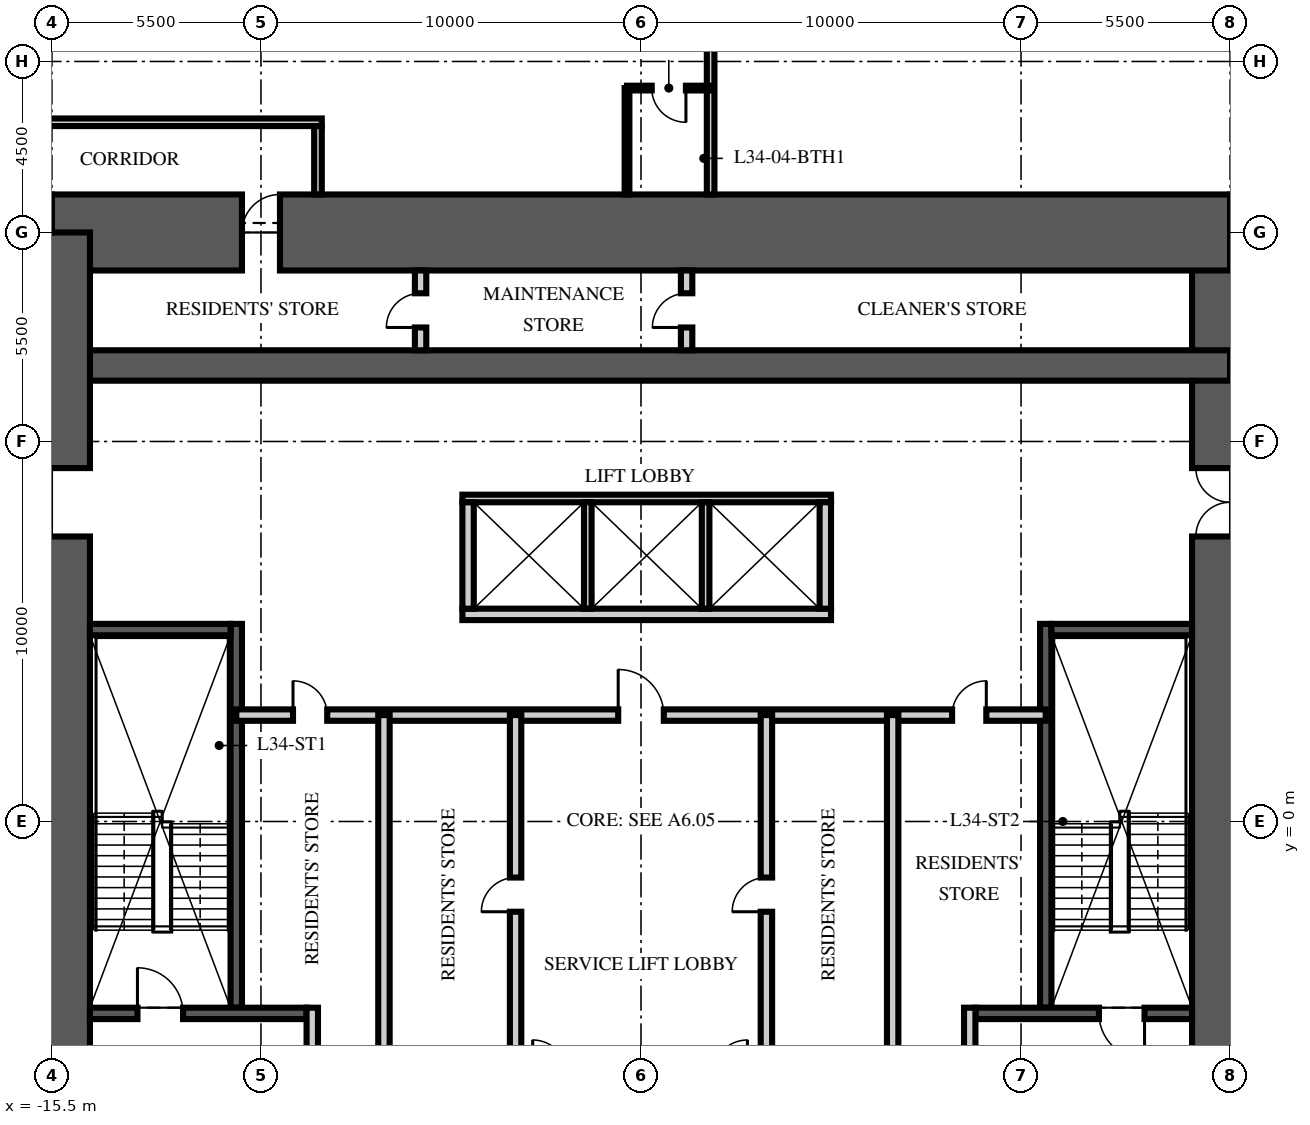
"""IFC4 building model, lengths in metres.
Left out: names, types, materials, properties, quantities, classifications, styles, units other than length and angle.
Written with IfcOpenShell. Run it as: python <this file> out.ifc"""

import sys

from ifc_helpers import new_model, si_unit, direction, frame, frame_2d, origin, place, context, subcontext, project, spatial, rectangle, extrude, element, fill, save


model = new_model("IFC4")
c1 = context("Model", 3, precision=1e-05, world=origin(), true_north=direction((0.0, 1.0)))
c2 = subcontext(c1, "Body", "Model", "MODEL_VIEW")
j1 = project(units=[si_unit("LENGTHUNIT", "METRE"), si_unit("PLANEANGLEUNIT", "RADIAN")], contexts=[c1])
p1 = place(None, origin())
s1 = spatial("IfcSite", under=j1, at=p1, CompositionType="ELEMENT")
p2 = place(p1, origin())
s2 = spatial("IfcBuilding", under=s1, at=p2, CompositionType="ELEMENT")
p3 = place(p2, frame((0.0, 0.0, 137.25)))
s3 = spatial("IfcBuildingStorey", under=s2, at=p3, CompositionType="ELEMENT", Elevation=137.25)
p4 = place(p3, frame((15.5, -15.5, -0.25), z_axis=(0.0, 0.0, 1.0), x_axis=(0.0, 1.0, 0.0)))
e1 = element("IfcWall", 1, at=p4, inside=s3, PredefinedType="SHEAR", context=c2, shape_type="SweptSolid", body=[
    extrude(rectangle(XDim=31.0, YDim=2.0, at=frame_2d((15.5, 0.0))), origin(), (0.0, 0.0, 1.0), 3.75),
])
p5 = place(p4, frame((6.5, 0.0, 0.25)))
e2 = element("IfcOpeningElement", 2, at=p5, cuts=e1, PredefinedType="OPENING", context=c2, shape_type="SweptSolid", body=[
    extrude(rectangle(XDim=1.2, YDim=2.1, at=frame_2d((0.6, 1.05))), frame((0.0, 1.01, 0.0), z_axis=(0.0, -1.0, 0.0), x_axis=(1.0, 0.0, 0.0)), (0.0, 0.0, 1.0), 2.02),
])
p6 = place(p4, frame((23.0, 0.0, 0.25)))
e3 = element("IfcOpeningElement", 3, at=p6, cuts=e1, PredefinedType="OPENING", context=c2, shape_type="SweptSolid", body=[
    extrude(rectangle(XDim=1.8, YDim=2.1, at=frame_2d((0.9, 1.05))), frame((0.0, 1.01, 0.0), z_axis=(0.0, -1.0, 0.0), x_axis=(1.0, 0.0, 0.0)), (0.0, 0.0, 1.0), 2.02),
])
p7 = place(p3, frame((-15.5, 15.5, -0.25), z_axis=(0.0, 0.0, 1.0), x_axis=(1.0, 0.0, 0.0)))
e4 = element("IfcWall", 4, at=p7, inside=s3, PredefinedType="SHEAR", context=c2, shape_type="SweptSolid", body=[
    extrude(rectangle(XDim=31.0, YDim=2.0, at=frame_2d((15.5, 0.0))), origin(), (0.0, 0.0, 1.0), 3.75),
])
p8 = place(p7, frame((5.0, 0.0, 0.25)))
e5 = element("IfcOpeningElement", 5, at=p8, cuts=e4, PredefinedType="OPENING", context=c2, shape_type="SweptSolid", body=[
    extrude(rectangle(XDim=1.0, YDim=2.1, at=frame_2d((0.5, 1.05))), frame((0.0, 1.01, 0.0), z_axis=(0.0, -1.0, 0.0), x_axis=(1.0, 0.0, 0.0)), (0.0, 0.0, 1.0), 2.02),
])
p9 = place(p3, frame((-15.5, 12.0, -0.25), z_axis=(0.0, 0.0, 1.0), x_axis=(1.0, 0.0, 0.0)))
e6 = element("IfcWall", 6, at=p9, inside=s3, PredefinedType="SHEAR", context=c2, shape_type="SweptSolid", body=[
    extrude(rectangle(XDim=31.0, YDim=0.8, at=frame_2d((15.5, 0.0))), origin(), (0.0, 0.0, 1.0), 3.75),
])
p10 = place(p3, frame((-15.5, -15.5, -0.25), z_axis=(0.0, 0.0, 1.0), x_axis=(0.0, 1.0, 0.0)))
e7 = element("IfcWall", 7, at=p10, inside=s3, PredefinedType="SHEAR", context=c2, shape_type="SweptSolid", body=[
    extrude(rectangle(XDim=31.0, YDim=2.0, at=frame_2d((15.5, 0.0))), origin(), (0.0, 0.0, 1.0), 3.75),
])
p11 = place(p10, frame((6.5, 0.0, 0.25)))
e8 = element("IfcOpeningElement", 8, at=p11, cuts=e7, PredefinedType="OPENING", context=c2, shape_type="SweptSolid", body=[
    extrude(rectangle(XDim=1.2, YDim=2.1, at=frame_2d((0.6, 1.05))), frame((0.0, 1.01, 0.0), z_axis=(0.0, -1.0, 0.0), x_axis=(1.0, 0.0, 0.0)), (0.0, 0.0, 1.0), 2.02),
])
p12 = place(p10, frame((23.0, 0.0, 0.25)))
e9 = element("IfcOpeningElement", 9, at=p12, cuts=e7, PredefinedType="OPENING", context=c2, shape_type="SweptSolid", body=[
    extrude(rectangle(XDim=1.8, YDim=2.1, at=frame_2d((0.9, 1.05))), frame((0.0, 1.01, 0.0), z_axis=(0.0, -1.0, 0.0), x_axis=(1.0, 0.0, 0.0)), (0.0, 0.0, 1.0), 2.02),
])
p13 = place(p3, frame((-10.65, -4.9, 0.0), z_axis=(0.0, 0.0, 1.0), x_axis=(0.0, 1.0, 0.0)))
e10 = element("IfcWall", 10, at=p13, inside=s3, PredefinedType="SOLIDWALL", context=c2, shape_type="SweptSolid", body=[
    extrude(rectangle(XDim=10.1, YDim=0.3, at=frame_2d((5.05, 0.0))), origin(), (0.0, 0.0, 1.0), 3.5),
])
p14 = place(p3, frame((-14.5, -5.05, 0.0), z_axis=(0.0, 0.0, 1.0), x_axis=(1.0, 0.0, 0.0)))
e11 = element("IfcWall", 11, at=p14, inside=s3, PredefinedType="SOLIDWALL", context=c2, shape_type="SweptSolid", body=[
    extrude(rectangle(XDim=5.7, YDim=0.3, at=frame_2d((2.85, 0.0))), origin(), (0.0, 0.0, 1.0), 3.5),
])
p15 = place(p14, frame((1.25, 0.0, 0.0)))
e12 = element("IfcOpeningElement", 12, at=p15, cuts=e11, PredefinedType="OPENING", context=c2, shape_type="SweptSolid", body=[
    extrude(rectangle(XDim=1.2, YDim=2.1, at=frame_2d((0.6, 1.05))), frame((0.0, 0.16, 0.0), z_axis=(0.0, -1.0, 0.0), x_axis=(1.0, 0.0, 0.0)), (0.0, 0.0, 1.0), 0.32),
])
p16 = place(p3, frame((-14.5, 5.05, 0.0), z_axis=(0.0, 0.0, 1.0), x_axis=(1.0, 0.0, 0.0)))
e13 = element("IfcWall", 13, at=p16, inside=s3, PredefinedType="SOLIDWALL", context=c2, shape_type="SweptSolid", body=[
    extrude(rectangle(XDim=3.7, YDim=0.3, at=frame_2d((1.85, 0.0))), origin(), (0.0, 0.0, 1.0), 3.5),
])
p17 = place(p3, frame((-8.65, -11.6, 0.0), z_axis=(0.0, 0.0, 1.0), x_axis=(0.0, 1.0, 0.0)))
e14 = element("IfcWall", 14, at=p17, inside=s3, PredefinedType="PARTITIONING", context=c2, shape_type="SweptSolid", body=[
    extrude(rectangle(XDim=6.7, YDim=0.3, at=frame_2d((3.35, 0.0))), origin(), (0.0, 0.0, 1.0), 3.5),
])
p18 = place(p17, frame((2.85, 0.0, 0.0)))
e15 = element("IfcOpeningElement", 15, at=p18, cuts=e14, PredefinedType="OPENING", context=c2, shape_type="SweptSolid", body=[
    extrude(rectangle(XDim=1.1, YDim=2.1, at=frame_2d((0.55, 1.05))), frame((0.0, 0.16, 0.0), z_axis=(0.0, -1.0, 0.0), x_axis=(1.0, 0.0, 0.0)), (0.0, 0.0, 1.0), 0.32),
])
p19 = place(p3, frame((10.65, -4.9, 0.0), z_axis=(0.0, 0.0, 1.0), x_axis=(0.0, 1.0, 0.0)))
e16 = element("IfcWall", 16, at=p19, inside=s3, PredefinedType="SOLIDWALL", context=c2, shape_type="SweptSolid", body=[
    extrude(rectangle(XDim=10.1, YDim=0.3, at=frame_2d((5.05, 0.0))), origin(), (0.0, 0.0, 1.0), 3.5),
])
p20 = place(p3, frame((14.5, -5.05, 0.0), z_axis=(0.0, 0.0, 1.0), x_axis=(-1.0, 0.0, 0.0)))
e17 = element("IfcWall", 17, at=p20, inside=s3, PredefinedType="SOLIDWALL", context=c2, shape_type="SweptSolid", body=[
    extrude(rectangle(XDim=5.7, YDim=0.3, at=frame_2d((2.85, 0.0))), origin(), (0.0, 0.0, 1.0), 3.5),
])
p21 = place(p20, frame((1.25, 0.0, 0.0)))
e18 = element("IfcOpeningElement", 18, at=p21, cuts=e17, PredefinedType="OPENING", context=c2, shape_type="SweptSolid", body=[
    extrude(rectangle(XDim=1.2, YDim=2.1, at=frame_2d((0.6, 1.05))), frame((0.0, 0.16, 0.0), z_axis=(0.0, -1.0, 0.0), x_axis=(1.0, 0.0, 0.0)), (0.0, 0.0, 1.0), 0.32),
])
p22 = place(p3, frame((14.5, 5.05, 0.0), z_axis=(0.0, 0.0, 1.0), x_axis=(-1.0, 0.0, 0.0)))
e19 = element("IfcWall", 19, at=p22, inside=s3, PredefinedType="SOLIDWALL", context=c2, shape_type="SweptSolid", body=[
    extrude(rectangle(XDim=3.7, YDim=0.3, at=frame_2d((1.85, 0.0))), origin(), (0.0, 0.0, 1.0), 3.5),
])
p23 = place(p3, frame((8.65, -11.6, 0.0), z_axis=(0.0, 0.0, 1.0), x_axis=(0.0, 1.0, 0.0)))
e20 = element("IfcWall", 20, at=p23, inside=s3, PredefinedType="PARTITIONING", context=c2, shape_type="SweptSolid", body=[
    extrude(rectangle(XDim=6.7, YDim=0.3, at=frame_2d((3.35, 0.0))), origin(), (0.0, 0.0, 1.0), 3.5),
])
p24 = place(p23, frame((2.85, 0.0, 0.0)))
e21 = element("IfcOpeningElement", 21, at=p24, cuts=e20, PredefinedType="OPENING", context=c2, shape_type="SweptSolid", body=[
    extrude(rectangle(XDim=1.1, YDim=2.1, at=frame_2d((0.55, 1.05))), frame((0.0, 0.16, 0.0), z_axis=(0.0, -1.0, 0.0), x_axis=(1.0, 0.0, 0.0)), (0.0, 0.0, 1.0), 0.32),
])
p25 = place(p3, frame((-4.7, 5.45, 0.0), z_axis=(0.0, 0.0, 1.0), x_axis=(1.0, 0.0, 0.0)))
e22 = element("IfcWall", 22, at=p25, inside=s3, PredefinedType="PARTITIONING", context=c2, shape_type="SweptSolid", body=[
    extrude(rectangle(XDim=9.7, YDim=0.3, at=frame_2d((4.85, 0.0))), origin(), (0.0, 0.0, 1.0), 3.5),
])
p26 = place(p3, frame((-4.7, 8.5, 0.0), z_axis=(0.0, 0.0, 1.0), x_axis=(1.0, 0.0, 0.0)))
e23 = element("IfcWall", 23, at=p26, inside=s3, PredefinedType="PARTITIONING", context=c2, shape_type="SweptSolid", body=[
    extrude(rectangle(XDim=9.7, YDim=0.2, at=frame_2d((4.85, 0.0))), origin(), (0.0, 0.0, 1.0), 3.5),
])
for number, where, z_axis, x_axis in (
    (24, (-4.55, 5.6, 0.0), (0.0, 0.0, 1.0), (0.0, 1.0, 0.0)),
    (25, (4.85, 5.6, 0.0), (0.0, 0.0, 1.0), (0.0, 1.0, 0.0)),
):
    element("IfcWall", number, at=place(p3, frame(where, z_axis=z_axis, x_axis=x_axis)), inside=s3, PredefinedType="PARTITIONING", context=c2, shape_type="SweptSolid", body=[
        extrude(rectangle(XDim=2.8, YDim=0.3, at=frame_2d((1.4, 0.0))), origin(), (0.0, 0.0, 1.0), 3.5),
    ])
for number, where, z_axis, x_axis in (
    (26, (-1.4, 5.6, 0.0), (0.0, 0.0, 1.0), (0.0, 1.0, 0.0)),
    (27, (1.7, 5.6, 0.0), (0.0, 0.0, 1.0), (0.0, 1.0, 0.0)),
):
    element("IfcWall", number, at=place(p3, frame(where, z_axis=z_axis, x_axis=x_axis)), inside=s3, PredefinedType="PARTITIONING", context=c2, shape_type="SweptSolid", body=[
        extrude(rectangle(XDim=2.8, YDim=0.2, at=frame_2d((1.4, 0.0))), origin(), (0.0, 0.0, 1.0), 3.5),
    ])
p27 = place(p3, frame((-10.65, 2.8, 0.0), z_axis=(0.0, 0.0, 1.0), x_axis=(1.0, 0.0, 0.0)))
e28 = element("IfcWall", 28, at=p27, inside=s3, PredefinedType="PARTITIONING", context=c2, shape_type="SweptSolid", body=[
    extrude(rectangle(XDim=21.3, YDim=0.3, at=frame_2d((10.65, 0.0))), origin(), (0.0, 0.0, 1.0), 3.5),
])
p28 = place(p27, frame((10.05, 0.0, 0.0)))
e29 = element("IfcOpeningElement", 29, at=p28, cuts=e28, PredefinedType="OPENING", context=c2, shape_type="SweptSolid", body=[
    extrude(rectangle(XDim=1.2, YDim=2.1, at=frame_2d((0.6, 1.05))), frame((0.0, 0.16, 0.0), z_axis=(0.0, -1.0, 0.0), x_axis=(1.0, 0.0, 0.0)), (0.0, 0.0, 1.0), 0.32),
])
p29 = place(p27, frame((1.493, 0.0, 0.0)))
e30 = element("IfcOpeningElement", 30, at=p29, cuts=e28, PredefinedType="OPENING", context=c2, shape_type="SweptSolid", body=[
    extrude(rectangle(XDim=0.9, YDim=2.1, at=frame_2d((0.45, 1.05))), frame((0.0, 0.16, 0.0), z_axis=(0.0, -1.0, 0.0), x_axis=(1.0, 0.0, 0.0)), (0.0, 0.0, 1.0), 0.32),
])
p30 = place(p27, frame((18.836, 0.0, 0.0)))
e31 = element("IfcOpeningElement", 31, at=p30, cuts=e28, PredefinedType="OPENING", context=c2, shape_type="SweptSolid", body=[
    extrude(rectangle(XDim=0.9, YDim=2.1, at=frame_2d((0.45, 1.05))), frame((0.0, 0.16, 0.0), z_axis=(0.0, -1.0, 0.0), x_axis=(1.0, 0.0, 0.0)), (0.0, 0.0, 1.0), 0.32),
])
p31 = place(p3, frame((-3.3, -6.65, 0.0), z_axis=(0.0, 0.0, 1.0), x_axis=(0.0, 1.0, 0.0)))
e32 = element("IfcWall", 32, at=p31, inside=s3, PredefinedType="PARTITIONING", context=c2, shape_type="SweptSolid", body=[
    extrude(rectangle(XDim=9.45, YDim=0.3, at=frame_2d((4.725, 0.0))), origin(), (0.0, 0.0, 1.0), 3.5),
])
p32 = place(p31, frame((4.275, 0.0, 0.0)))
e33 = element("IfcOpeningElement", 33, at=p32, cuts=e32, PredefinedType="OPENING", context=c2, shape_type="SweptSolid", body=[
    extrude(rectangle(XDim=0.9, YDim=2.1, at=frame_2d((0.45, 1.05))), frame((0.0, 0.16, 0.0), z_axis=(0.0, -1.0, 0.0), x_axis=(1.0, 0.0, 0.0)), (0.0, 0.0, 1.0), 0.32),
])
p33 = place(p3, frame((3.3, -6.65, 0.0), z_axis=(0.0, 0.0, 1.0), x_axis=(0.0, 1.0, 0.0)))
e34 = element("IfcWall", 34, at=p33, inside=s3, PredefinedType="PARTITIONING", context=c2, shape_type="SweptSolid", body=[
    extrude(rectangle(XDim=9.45, YDim=0.3, at=frame_2d((4.725, 0.0))), origin(), (0.0, 0.0, 1.0), 3.5),
])
p34 = place(p33, frame((4.275, 0.0, 0.0)))
e35 = element("IfcOpeningElement", 35, at=p34, cuts=e34, PredefinedType="OPENING", context=c2, shape_type="SweptSolid", body=[
    extrude(rectangle(XDim=0.9, YDim=2.1, at=frame_2d((0.45, 1.05))), frame((0.0, 0.16, 0.0), z_axis=(0.0, -1.0, 0.0), x_axis=(1.0, 0.0, 0.0)), (0.0, 0.0, 1.0), 0.32),
])
for number, where, z_axis, x_axis in (
    (36, (-6.764, -6.65, 0.0), (0.0, 0.0, 1.0), (0.0, 1.0, 0.0)),
    (37, (6.622, -6.65, 0.0), (0.0, 0.0, 1.0), (0.0, 1.0, 0.0)),
):
    element("IfcWall", number, at=place(p3, frame(where, z_axis=z_axis, x_axis=x_axis)), inside=s3, PredefinedType="PARTITIONING", context=c2, shape_type="SweptSolid", body=[
        extrude(rectangle(XDim=9.45, YDim=0.3, at=frame_2d((4.725, 0.0))), origin(), (0.0, 0.0, 1.0), 3.5),
    ])
p35 = place(p3, frame((-5.8, 12.4, 0.0), z_axis=(0.0, 0.0, 1.0), x_axis=(0.0, 1.0, 0.0)))
e38 = element("IfcWall", 38, at=p35, inside=s3, PredefinedType="PARTITIONING", context=c2, shape_type="SweptSolid", body=[
    extrude(rectangle(XDim=2.1, YDim=0.3, at=frame_2d((1.05, 0.0))), origin(), (0.0, 0.0, 1.0), 3.5),
])
p36 = place(p35, frame((0.6, 0.0, 0.0)))
e39 = element("IfcOpeningElement", 39, at=p36, cuts=e38, PredefinedType="OPENING", context=c2, shape_type="SweptSolid", body=[
    extrude(rectangle(XDim=0.9, YDim=2.1, at=frame_2d((0.45, 1.05))), frame((0.0, 0.16, 0.0), z_axis=(0.0, -1.0, 0.0), x_axis=(1.0, 0.0, 0.0)), (0.0, 0.0, 1.0), 0.32),
])
p37 = place(p3, frame((1.2, 12.4, 0.0), z_axis=(0.0, 0.0, 1.0), x_axis=(0.0, 1.0, 0.0)))
e40 = element("IfcWall", 40, at=p37, inside=s3, PredefinedType="PARTITIONING", context=c2, shape_type="SweptSolid", body=[
    extrude(rectangle(XDim=2.1, YDim=0.3, at=frame_2d((1.05, 0.0))), origin(), (0.0, 0.0, 1.0), 3.5),
])
p38 = place(p37, frame((0.6, 0.0, 0.0)))
e41 = element("IfcOpeningElement", 41, at=p38, cuts=e40, PredefinedType="OPENING", context=c2, shape_type="SweptSolid", body=[
    extrude(rectangle(XDim=0.9, YDim=2.1, at=frame_2d((0.45, 1.05))), frame((0.0, 0.16, 0.0), z_axis=(0.0, -1.0, 0.0), x_axis=(1.0, 0.0, 0.0)), (0.0, 0.0, 1.0), 0.32),
])
p39 = place(p3, frame((-18.5, 18.4, 0.0), z_axis=(0.0, 0.0, 1.0), x_axis=(1.0, 0.0, 0.0)))
e42 = element("IfcWall", 42, at=p39, inside=s3, PredefinedType="PARTITIONING", context=c2, shape_type="SweptSolid", body=[
    extrude(rectangle(XDim=10.1, YDim=0.2, at=frame_2d((5.05, 0.0))), origin(), (0.0, 0.0, 1.0), 2.3),
])
p40 = place(p3, frame((-8.5, 18.3, 0.0), z_axis=(0.0, 0.0, 1.0), x_axis=(0.0, -1.0, 0.0)))
e43 = element("IfcWall", 43, at=p40, inside=s3, PredefinedType="PARTITIONING", context=c2, shape_type="SweptSolid", body=[
    extrude(rectangle(XDim=1.8, YDim=0.2, at=frame_2d((0.9, 0.0))), origin(), (0.0, 0.0, 1.0), 3.5),
])
p41 = place(p3, frame((1.832, 16.5, 0.0), z_axis=(0.0, 0.0, 1.0), x_axis=(0.0, 1.0, 0.0)))
e44 = element("IfcWall", 44, at=p41, inside=s3, PredefinedType="PARTITIONING", context=c2, shape_type="SweptSolid", body=[
    extrude(rectangle(XDim=12.15, YDim=0.2, at=frame_2d((6.075, 0.0))), origin(), (0.0, 0.0, 1.0), 2.81),
])
p42 = place(p3, frame((1.832, 19.3, 0.0), z_axis=(0.0, 0.0, 1.0), x_axis=(-1.0, 0.0, 0.0)))
e45 = element("IfcWall", 45, at=p42, inside=s3, PredefinedType="PARTITIONING", context=c2, shape_type="SweptSolid", body=[
    extrude(rectangle(XDim=2.2, YDim=0.125, at=frame_2d((1.1, 0.0))), origin(), (0.0, 0.0, 1.0), 2.7),
])
p43 = place(p42, frame((0.65, 0.0, 0.0)))
e46 = element("IfcOpeningElement", 46, at=p43, cuts=e45, PredefinedType="OPENING", context=c2, shape_type="SweptSolid", body=[
    extrude(rectangle(XDim=0.9, YDim=2.1, at=frame_2d((0.45, 1.05))), frame((0.0, 0.073, 0.0), z_axis=(0.0, -1.0, 0.0), x_axis=(1.0, 0.0, 0.0)), (0.0, 0.0, 1.0), 0.145),
])
p44 = place(p3, frame((-0.368, 16.5, 0.0), z_axis=(0.0, 0.0, 1.0), x_axis=(0.0, 1.0, 0.0)))
e47 = element("IfcWall", 47, at=p44, inside=s3, PredefinedType="PARTITIONING", context=c2, shape_type="SweptSolid", body=[
    extrude(rectangle(XDim=2.8, YDim=0.125, at=frame_2d((1.4, 0.0))), origin(), (0.0, 0.0, 1.0), 3.5),
])
p45 = place(p15, origin())
e48 = element("IfcDoor", 48, at=p45, inside=s3, OperationType="SINGLE_SWING_LEFT", PredefinedType="DOOR", context=c2, shape_type="SweptSolid", body=[
    extrude(rectangle(XDim=1.2, YDim=2.1, at=frame_2d((0.6, 1.05))), frame((0.0, 0.025, 0.0), z_axis=(0.0, -1.0, 0.0), x_axis=(1.0, 0.0, 0.0)), (0.0, 0.0, 1.0), 0.05),
])
fill(e12, e48)
p46 = place(p12, origin())
e49 = element("IfcDoor", 49, at=p46, inside=s3, OperationType="DOUBLE_DOOR_SINGLE_SWING", PredefinedType="DOOR", context=c2, shape_type="SweptSolid", body=[
    extrude(rectangle(XDim=1.8, YDim=2.1, at=frame_2d((0.9, 1.05))), frame((0.0, 0.025, 0.0), z_axis=(0.0, -1.0, 0.0), x_axis=(1.0, 0.0, 0.0)), (0.0, 0.0, 1.0), 0.05),
])
fill(e9, e49)
p47 = place(p21, origin())
e50 = element("IfcDoor", 50, at=p47, inside=s3, OperationType="SINGLE_SWING_LEFT", PredefinedType="DOOR", context=c2, shape_type="SweptSolid", body=[
    extrude(rectangle(XDim=1.2, YDim=2.1, at=frame_2d((0.6, 1.05))), frame((0.0, 0.025, 0.0), z_axis=(0.0, -1.0, 0.0), x_axis=(1.0, 0.0, 0.0)), (0.0, 0.0, 1.0), 0.05),
])
fill(e18, e50)
p48 = place(p6, origin())
e51 = element("IfcDoor", 51, at=p48, inside=s3, OperationType="DOUBLE_DOOR_SINGLE_SWING", PredefinedType="DOOR", context=c2, shape_type="SweptSolid", body=[
    extrude(rectangle(XDim=1.8, YDim=2.1, at=frame_2d((0.9, 1.05))), frame((0.0, 0.025, 0.0), z_axis=(0.0, -1.0, 0.0), x_axis=(1.0, 0.0, 0.0)), (0.0, 0.0, 1.0), 0.05),
])
fill(e3, e51)
p49 = place(p28, origin())
e52 = element("IfcDoor", 52, at=p49, inside=s3, OperationType="SINGLE_SWING_LEFT", PredefinedType="DOOR", context=c2, shape_type="SweptSolid", body=[
    extrude(rectangle(XDim=1.2, YDim=2.1, at=frame_2d((0.6, 1.05))), frame((0.0, 0.025, 0.0), z_axis=(0.0, -1.0, 0.0), x_axis=(1.0, 0.0, 0.0)), (0.0, 0.0, 1.0), 0.05),
])
fill(e29, e52)
p50 = place(p32, origin())
e53 = element("IfcDoor", 53, at=p50, inside=s3, OperationType="SINGLE_SWING_LEFT", PredefinedType="DOOR", context=c2, shape_type="SweptSolid", body=[
    extrude(rectangle(XDim=0.9, YDim=2.1, at=frame_2d((0.45, 1.05))), frame((0.0, 0.025, 0.0), z_axis=(0.0, -1.0, 0.0), x_axis=(1.0, 0.0, 0.0)), (0.0, 0.0, 1.0), 0.05),
])
fill(e33, e53)
p51 = place(p29, origin())
e54 = element("IfcDoor", 54, at=p51, inside=s3, OperationType="SINGLE_SWING_LEFT", PredefinedType="DOOR", context=c2, shape_type="SweptSolid", body=[
    extrude(rectangle(XDim=0.9, YDim=2.1, at=frame_2d((0.45, 1.05))), frame((0.0, 0.025, 0.0), z_axis=(0.0, -1.0, 0.0), x_axis=(1.0, 0.0, 0.0)), (0.0, 0.0, 1.0), 0.05),
])
fill(e30, e54)
p52 = place(p34, origin())
e55 = element("IfcDoor", 55, at=p52, inside=s3, OperationType="SINGLE_SWING_LEFT", PredefinedType="DOOR", context=c2, shape_type="SweptSolid", body=[
    extrude(rectangle(XDim=0.9, YDim=2.1, at=frame_2d((0.45, 1.05))), frame((0.0, 0.025, 0.0), z_axis=(0.0, -1.0, 0.0), x_axis=(1.0, 0.0, 0.0)), (0.0, 0.0, 1.0), 0.05),
])
fill(e35, e55)
p53 = place(p30, origin())
e56 = element("IfcDoor", 56, at=p53, inside=s3, OperationType="SINGLE_SWING_RIGHT", PredefinedType="DOOR", context=c2, shape_type="SweptSolid", body=[
    extrude(rectangle(XDim=0.9, YDim=2.1, at=frame_2d((0.45, 1.05))), frame((0.0, 0.025, 0.0), z_axis=(0.0, -1.0, 0.0), x_axis=(1.0, 0.0, 0.0)), (0.0, 0.0, 1.0), 0.05),
])
fill(e31, e56)
p54 = place(p36, origin())
e57 = element("IfcDoor", 57, at=p54, inside=s3, OperationType="SINGLE_SWING_LEFT", PredefinedType="DOOR", context=c2, shape_type="SweptSolid", body=[
    extrude(rectangle(XDim=0.9, YDim=2.1, at=frame_2d((0.45, 1.05))), frame((0.0, 0.025, 0.0), z_axis=(0.0, -1.0, 0.0), x_axis=(1.0, 0.0, 0.0)), (0.0, 0.0, 1.0), 0.05),
])
fill(e39, e57)
p55 = place(p38, origin())
e58 = element("IfcDoor", 58, at=p55, inside=s3, OperationType="SINGLE_SWING_LEFT", PredefinedType="DOOR", context=c2, shape_type="SweptSolid", body=[
    extrude(rectangle(XDim=0.9, YDim=2.1, at=frame_2d((0.45, 1.05))), frame((0.0, 0.025, 0.0), z_axis=(0.0, -1.0, 0.0), x_axis=(1.0, 0.0, 0.0)), (0.0, 0.0, 1.0), 0.05),
])
fill(e41, e58)
p56 = place(p8, origin())
e59 = element("IfcDoor", 59, at=p56, inside=s3, OperationType="SINGLE_SWING_RIGHT", PredefinedType="DOOR", context=c2, shape_type="SweptSolid", body=[
    extrude(rectangle(XDim=1.0, YDim=2.1, at=frame_2d((0.5, 1.05))), frame((0.0, 0.025, 0.0), z_axis=(0.0, -1.0, 0.0), x_axis=(1.0, 0.0, 0.0)), (0.0, 0.0, 1.0), 0.05),
])
fill(e5, e59)
p57 = place(p43, origin())
e60 = element("IfcDoor", 60, at=p57, inside=s3, OperationType="SINGLE_SWING_LEFT", PredefinedType="DOOR", context=c2, shape_type="SweptSolid", body=[
    extrude(rectangle(XDim=0.9, YDim=2.1, at=frame_2d((0.45, 1.05))), frame((0.0, 0.025, 0.0), z_axis=(0.0, -1.0, 0.0), x_axis=(1.0, 0.0, 0.0)), (0.0, 0.0, 1.0), 0.05),
])
fill(e46, e60)
save(model, sys.argv[1])
